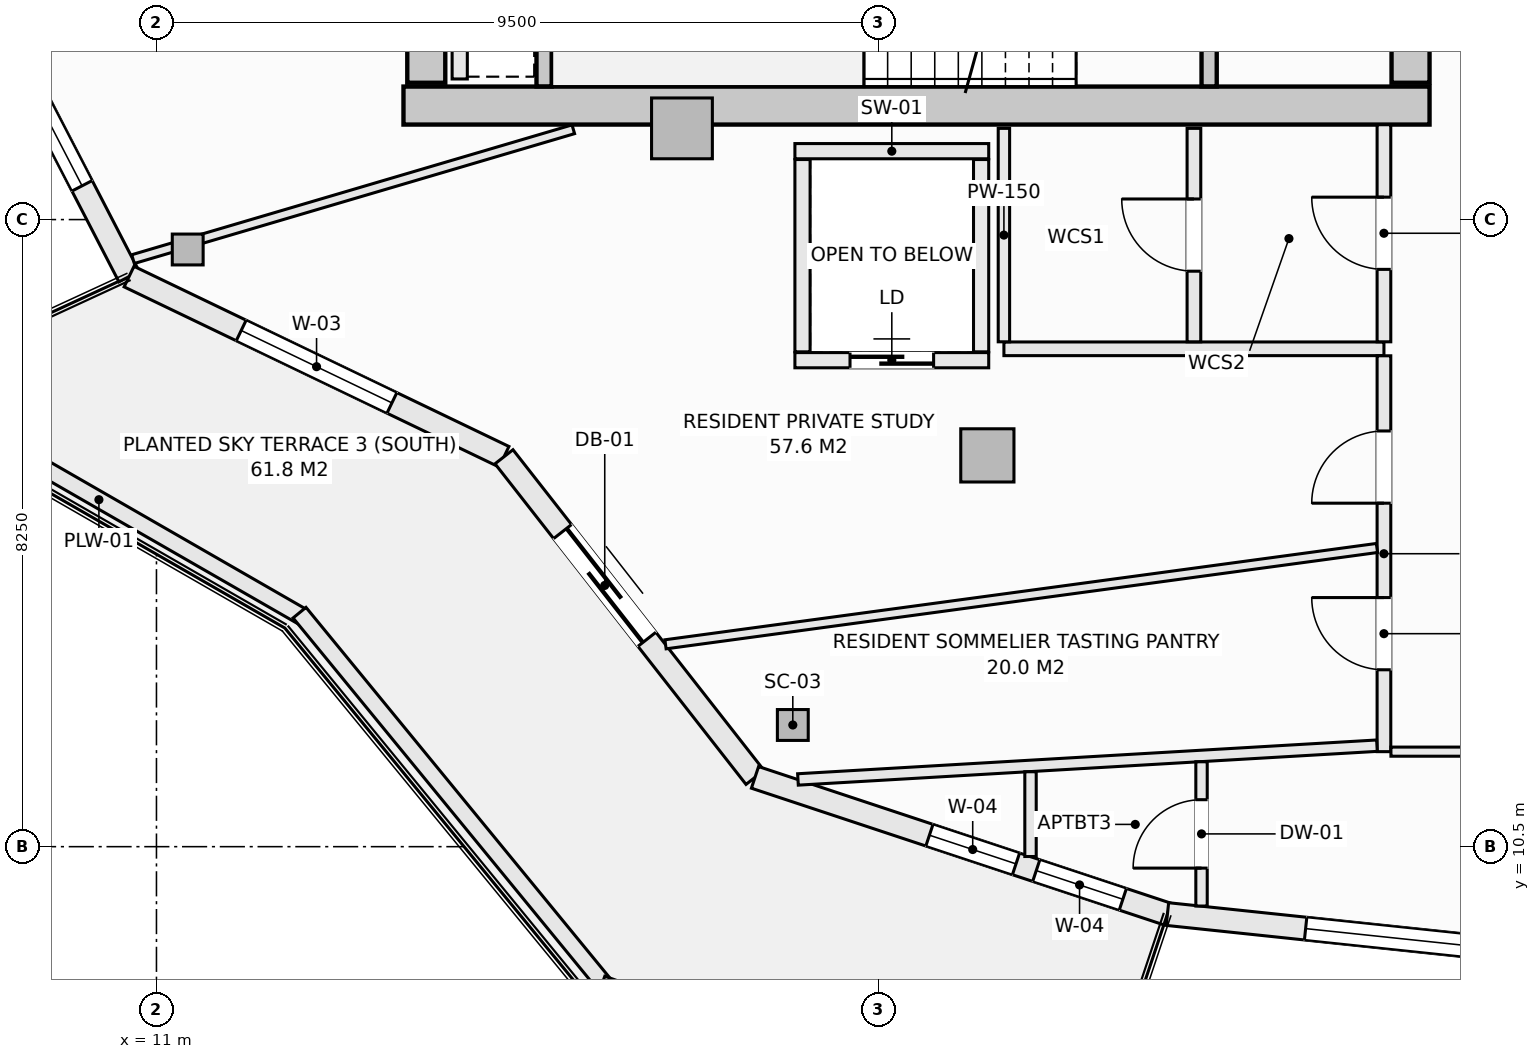
"""IFC4 building model, lengths in metres.
Left out: names, types, materials, properties, quantities, classifications, styles, units other than length and angle.
Written with IfcOpenShell. Run it as: python <this file> out.ifc"""

import sys

from ifc_helpers import new_model, si_unit, direction, frame, frame_2d, origin, origin_2d, place, context, subcontext, project, spatial, rectangle, hollow_rectangle, extrude, element, fill, save


model = new_model("IFC4")
c1 = context("Model", 3, precision=1e-05, world=origin(), true_north=direction((0.0, 1.0)))
c2 = subcontext(c1, "Body", "Model", "MODEL_VIEW")
j1 = project(units=[si_unit("LENGTHUNIT", "METRE"), si_unit("PLANEANGLEUNIT", "RADIAN")], contexts=[c1])
p1 = place(None, origin())
s1 = spatial("IfcSite", under=j1, at=p1, CompositionType="ELEMENT")
p2 = place(p1, origin())
s2 = spatial("IfcBuilding", under=s1, at=p2, CompositionType="ELEMENT")
p3 = place(p2, frame((0.0, 0.0, 242.6)))
s3 = spatial("IfcBuildingStorey", under=s2, at=p3, CompositionType="ELEMENT", Elevation=242.6)
p4 = place(p3, frame((14.25, 20.25, -0.27), z_axis=(0.0, 0.0, 1.0), x_axis=(1.0, 0.0, 0.0)))
e1 = element("IfcWall", 1, at=p4, inside=s3, PredefinedType="SHEAR", context=c2, shape_type="SweptSolid", body=[
    extrude(rectangle(XDim=13.5, YDim=0.5, at=frame_2d((6.75, 0.0))), origin(), (0.0, 0.0, 1.0), 3.3),
])
p5 = place(p3, frame((14.55, 20.55, -0.27), z_axis=(0.0, 0.0, 1.0), x_axis=(0.0, 1.0, 0.0)))
e2 = element("IfcWall", 2, at=p5, inside=s3, PredefinedType="SHEAR", context=c2, shape_type="SweptSolid", body=[
    extrude(rectangle(XDim=12.9, YDim=0.5, at=frame_2d((6.45, 0.0))), origin(), (0.0, 0.0, 1.0), 3.3),
])
p6 = place(p3, frame((27.5, 20.55, -0.27), z_axis=(0.0, 0.0, 1.0), x_axis=(0.0, 1.0, 0.0)))
e3 = element("IfcWall", 3, at=p6, inside=s3, PredefinedType="SHEAR", context=c2, shape_type="SweptSolid", body=[
    extrude(rectangle(XDim=1.5, YDim=0.5, at=frame_2d((0.75, 0.0))), origin(), (0.0, 0.0, 1.0), 3.3),
])
for number, where, z_axis, x_axis in (
    (4, (11.411, 18.356, -0.27), (0.0, 0.0, 1.0), (1.0, 0.0, 0.0)),
    (5, (19.372, 12.101, -0.27), (0.0, 0.0, 1.0), (1.0, 0.0, 0.0)),
):
    element("IfcColumn", number, at=place(p3, frame(where, z_axis=z_axis, x_axis=x_axis)), inside=s3, PredefinedType="COLUMN", context=c2, shape_type="SweptSolid", body=[
        extrude(hollow_rectangle(XDim=0.406, YDim=0.406, WallThickness=0.016, at=origin_2d()), origin(), (0.0, 0.0, 1.0), 3.3),
    ])
p7 = place(p3, frame((21.932, 15.648, -0.27), z_axis=(0.0, 0.0, 1.0), x_axis=(1.0, 0.0, 0.0)))
e6 = element("IfcColumn", 6, at=p7, inside=s3, PredefinedType="COLUMN", context=c2, shape_type="SweptSolid", body=[
    extrude(rectangle(XDim=0.7, YDim=0.7, at=origin_2d()), origin(), (0.0, 0.0, 1.0), 3.3),
])
p8 = place(p3, frame((17.914, 19.95, -0.27), z_axis=(0.0, 0.0, 1.0), x_axis=(1.0, 0.0, 0.0)))
e7 = element("IfcColumn", 7, at=p8, inside=s3, PredefinedType="PILASTER", context=c2, shape_type="SweptSolid", body=[
    extrude(rectangle(XDim=0.8, YDim=0.8, at=origin_2d()), origin(), (0.0, 0.0, 1.0), 3.3),
])
p9 = place(p3, frame((8.392, 22.341, 0.0), z_axis=(0.0, 0.0, 1.0), x_axis=(0.459793771602, -0.888025724625, 0.0)))
e8 = element("IfcWall", 8, at=p9, inside=s3, PredefinedType="SOLIDWALL", context=c2, shape_type="SweptSolid", body=[
    extrude(rectangle(XDim=4.889, YDim=0.3, at=frame_2d((2.444, 0.0))), origin(), (0.0, 0.0, 1.0), 2.605),
])
p10 = place(p9, frame((1.344, 0.0, 0.72)))
e9 = element("IfcOpeningElement", 9, at=p10, cuts=e8, PredefinedType="OPENING", context=c2, shape_type="SweptSolid", body=[
    extrude(rectangle(XDim=2.2, YDim=1.65, at=frame_2d((1.1, 0.825))), frame((0.0, 0.16, 0.0), z_axis=(0.0, -1.0, 0.0), x_axis=(1.0, 0.0, 0.0)), (0.0, 0.0, 1.0), 0.32),
])
p11 = place(p3, frame((10.639, 18.0, 0.0), z_axis=(0.0, 0.0, 1.0), x_axis=(0.901355238351, -0.433080517106, 0.0)))
e10 = element("IfcWall", 10, at=p11, inside=s3, PredefinedType="SOLIDWALL", context=c2, shape_type="SweptSolid", body=[
    extrude(rectangle(XDim=5.473, YDim=0.3, at=frame_2d((2.737, 0.0))), origin(), (0.0, 0.0, 1.0), 2.605),
])
p12 = place(p11, frame((1.637, 0.0, 0.72)))
e11 = element("IfcOpeningElement", 11, at=p12, cuts=e10, PredefinedType="OPENING", context=c2, shape_type="SweptSolid", body=[
    extrude(rectangle(XDim=2.2, YDim=1.65, at=frame_2d((1.1, 0.825))), frame((0.0, 0.16, 0.0), z_axis=(0.0, -1.0, 0.0), x_axis=(1.0, 0.0, 0.0)), (0.0, 0.0, 1.0), 0.32),
])
p13 = place(p3, frame((15.573, 15.63, 0.0), z_axis=(0.0, 0.0, 1.0), x_axis=(0.61644588519, -0.787397276241, 0.0)))
e12 = element("IfcWall", 12, at=p13, inside=s3, PredefinedType="SOLIDWALL", context=c2, shape_type="SweptSolid", body=[
    extrude(rectangle(XDim=5.357, YDim=0.3, at=frame_2d((2.678, 0.0))), origin(), (0.0, 0.0, 1.0), 2.605),
])
p14 = place(p13, frame((1.25, 0.0, 0.0)))
e13 = element("IfcOpeningElement", 13, at=p14, cuts=e12, PredefinedType="OPENING", context=c2, shape_type="SweptSolid", body=[
    extrude(rectangle(XDim=1.8, YDim=2.25, at=frame_2d((0.9, 1.125))), frame((0.0, 0.16, 0.0), z_axis=(0.0, -1.0, 0.0), x_axis=(1.0, 0.0, 0.0)), (0.0, 0.0, 1.0), 0.32),
])
p15 = place(p3, frame((18.875, 11.412, 0.0), z_axis=(0.0, 0.0, 1.0), x_axis=(0.949232769585, -0.314574552605, 0.0)))
e14 = element("IfcWall", 14, at=p15, inside=s3, PredefinedType="SOLIDWALL", context=c2, shape_type="SweptSolid", body=[
    extrude(rectangle(XDim=5.717, YDim=0.3, at=frame_2d((2.858, 0.0))), origin(), (0.0, 0.0, 1.0), 2.605),
])
p16 = place(p15, frame((2.417, 0.0, 0.72)))
e15 = element("IfcOpeningElement", 15, at=p16, cuts=e14, PredefinedType="OPENING", context=c2, shape_type="SweptSolid", body=[
    extrude(rectangle(XDim=1.2, YDim=1.65, at=frame_2d((0.6, 0.825))), frame((0.0, 0.16, 0.0), z_axis=(0.0, -1.0, 0.0), x_axis=(1.0, 0.0, 0.0)), (0.0, 0.0, 1.0), 0.32),
])
p17 = place(p15, frame((3.898, 0.0, 0.72)))
e16 = element("IfcOpeningElement", 16, at=p17, cuts=e14, PredefinedType="OPENING", context=c2, shape_type="SweptSolid", body=[
    extrude(rectangle(XDim=1.2, YDim=1.65, at=frame_2d((0.6, 0.825))), frame((0.0, 0.16, 0.0), z_axis=(0.0, -1.0, 0.0), x_axis=(1.0, 0.0, 0.0)), (0.0, 0.0, 1.0), 0.32),
])
p18 = place(p3, frame((24.302, 9.613, 0.0), z_axis=(0.0, 0.0, 1.0), x_axis=(0.994500425783, -0.10473253132, 0.0)))
e17 = element("IfcWall", 17, at=p18, inside=s3, PredefinedType="SOLIDWALL", context=c2, shape_type="SweptSolid", body=[
    extrude(rectangle(XDim=5.856, YDim=0.3, at=frame_2d((2.928, 0.0))), origin(), (0.0, 0.0, 1.0), 2.605),
])
p19 = place(p18, frame((1.828, 0.0, 0.72)))
e18 = element("IfcOpeningElement", 18, at=p19, cuts=e17, PredefinedType="OPENING", context=c2, shape_type="SweptSolid", body=[
    extrude(rectangle(XDim=2.2, YDim=1.65, at=frame_2d((1.1, 0.825))), frame((0.0, 0.16, 0.0), z_axis=(0.0, -1.0, 0.0), x_axis=(1.0, 0.0, 0.0)), (0.0, 0.0, 1.0), 0.32),
])
p20 = place(p3, frame((7.557, 16.609, 0.0), z_axis=(0.0, 0.0, 1.0), x_axis=(0.866901621005, -0.49847926687, 0.0)))
e19 = element("IfcWall", 19, at=p20, inside=s3, PredefinedType="PARAPET", context=c2, shape_type="SweptSolid", body=[
    extrude(rectangle(XDim=6.197, YDim=0.22, at=frame_2d((3.098, 0.0))), origin(), (0.0, 0.0, 1.0), 0.52),
])
p21 = place(p3, frame((12.882, 13.579, 0.0), z_axis=(0.0, 0.0, 1.0), x_axis=(0.63407318032, -0.77327304492, 0.0)))
e20 = element("IfcWall", 20, at=p21, inside=s3, PredefinedType="PARAPET", context=c2, shape_type="SweptSolid", body=[
    extrude(rectangle(XDim=6.379, YDim=0.22, at=frame_2d((3.189, 0.0))), origin(), (0.0, 0.0, 1.0), 0.52),
])
p22 = place(p3, frame((16.862, 8.692, 0.0), z_axis=(0.0, 0.0, 1.0), x_axis=(0.941139090914, -0.338019543152, 0.0)))
e21 = element("IfcWall", 21, at=p22, inside=s3, PredefinedType="PARAPET", context=c2, shape_type="SweptSolid", body=[
    extrude(rectangle(XDim=6.807, YDim=0.22, at=frame_2d((3.403, 0.0))), origin(), (0.0, 0.0, 1.0), 0.52),
])
p23 = place(p3, frame((24.85, 20.502, -0.27), z_axis=(0.0, 0.0, 1.0), x_axis=(0.0, 1.0, 0.0)))
e22 = element("IfcWall", 22, at=p23, inside=s3, PredefinedType="SHEAR", context=c2, shape_type="SweptSolid", body=[
    extrude(rectangle(XDim=3.038, YDim=0.2, at=frame_2d((1.519, 0.0))), origin(), (0.0, 0.0, 1.0), 3.3),
])
p24 = place(p23, frame((0.969, 0.0, 0.27)))
e23 = element("IfcOpeningElement", 23, at=p24, cuts=e22, PredefinedType="OPENING", context=c2, shape_type="SweptSolid", body=[
    extrude(rectangle(XDim=1.1, YDim=2.15, at=frame_2d((0.55, 1.075))), frame((0.0, 0.11, 0.0), z_axis=(0.0, -1.0, 0.0), x_axis=(1.0, 0.0, 0.0)), (0.0, 0.0, 1.0), 0.22),
])
p25 = place(p3, frame((16.1, 20.502, -0.27), z_axis=(0.0, 0.0, 1.0), x_axis=(0.0, 1.0, 0.0)))
e24 = element("IfcWall", 24, at=p25, inside=s3, PredefinedType="SHEAR", context=c2, shape_type="SweptSolid", body=[
    extrude(rectangle(XDim=3.036, YDim=0.2, at=frame_2d((1.518, 0.0))), origin(), (0.0, 0.0, 1.0), 3.3),
])
p26 = place(p3, frame((19.4, 19.65, 0.0), z_axis=(0.0, 0.0, 1.0), x_axis=(1.0, 0.0, 0.0)))
e25 = element("IfcWall", 25, at=p26, inside=s3, PredefinedType="SOLIDWALL", context=c2, shape_type="SweptSolid", body=[
    extrude(rectangle(XDim=2.55, YDim=0.2, at=frame_2d((1.275, 0.0))), origin(), (0.0, 0.0, 1.0), 3.03),
])
p27 = place(p3, frame((19.4, 16.9, 0.0), z_axis=(0.0, 0.0, 1.0), x_axis=(1.0, 0.0, 0.0)))
e26 = element("IfcWall", 26, at=p27, inside=s3, PredefinedType="SOLIDWALL", context=c2, shape_type="SweptSolid", body=[
    extrude(rectangle(XDim=2.55, YDim=0.2, at=frame_2d((1.275, 0.0))), origin(), (0.0, 0.0, 1.0), 3.03),
])
p28 = place(p27, frame((0.725, 0.0, 0.0)))
e27 = element("IfcOpeningElement", 27, at=p28, cuts=e26, PredefinedType="OPENING", context=c2, shape_type="SweptSolid", body=[
    extrude(rectangle(XDim=1.1, YDim=2.2, at=frame_2d((0.55, 1.1))), frame((0.0, 0.11, 0.0), z_axis=(0.0, -1.0, 0.0), x_axis=(1.0, 0.0, 0.0)), (0.0, 0.0, 1.0), 0.22),
])
for number, where, z_axis, x_axis in (
    (28, (19.5, 17.01, 0.0), (0.0, 0.0, 1.0), (0.0, 1.0, 0.0)),
    (29, (21.85, 17.01, 0.0), (0.0, 0.0, 1.0), (0.0, 1.0, 0.0)),
):
    element("IfcWall", number, at=place(p3, frame(where, z_axis=z_axis, x_axis=x_axis)), inside=s3, PredefinedType="SOLIDWALL", context=c2, shape_type="SweptSolid", body=[
        extrude(rectangle(XDim=2.53, YDim=0.2, at=frame_2d((1.265, 0.0))), origin(), (0.0, 0.0, 1.0), 3.03),
    ])
p29 = place(p3, frame((14.99, 20.6, 0.0), z_axis=(0.0, 0.0, 1.0), x_axis=(0.0, 1.0, 0.0)))
e30 = element("IfcWall", 30, at=p29, inside=s3, PredefinedType="SOLIDWALL", context=c2, shape_type="SweptSolid", body=[
    extrude(rectangle(XDim=2.85, YDim=0.2, at=frame_2d((1.425, 0.0))), origin(), (0.0, 0.0, 1.0), 3.03),
])
p30 = place(p3, frame((22.15, 17.05, 0.0), z_axis=(0.0, 0.0, 1.0), x_axis=(1.0, 0.0, 0.0)))
e31 = element("IfcWall", 31, at=p30, inside=s3, PredefinedType="SOLIDWALL", context=c2, shape_type="SweptSolid", body=[
    extrude(rectangle(XDim=5.0, YDim=0.18, at=frame_2d((2.5, 0.0))), origin(), (0.0, 0.0, 1.0), 3.03),
])
p31 = place(p3, frame((22.15, 17.142, 0.0), z_axis=(0.0, 0.0, 1.0), x_axis=(0.0, 1.0, 0.0)))
e32 = element("IfcWall", 32, at=p31, inside=s3, PredefinedType="PARTITIONING", context=c2, shape_type="SweptSolid", body=[
    extrude(rectangle(XDim=2.808, YDim=0.15, at=frame_2d((1.404, 0.0))), origin(), (0.0, 0.0, 1.0), 3.03),
])
p32 = place(p3, frame((24.65, 17.142, 0.0), z_axis=(0.0, 0.0, 1.0), x_axis=(0.0, 1.0, 0.0)))
e33 = element("IfcWall", 33, at=p32, inside=s3, PredefinedType="SOLIDWALL", context=c2, shape_type="SweptSolid", body=[
    extrude(rectangle(XDim=2.808, YDim=0.18, at=frame_2d((1.404, 0.0))), origin(), (0.0, 0.0, 1.0), 3.03),
])
p33 = place(p32, frame((0.929, 0.0, 0.0)))
e34 = element("IfcOpeningElement", 34, at=p33, cuts=e33, PredefinedType="OPENING", context=c2, shape_type="SweptSolid", body=[
    extrude(rectangle(XDim=0.95, YDim=2.1, at=frame_2d((0.475, 1.05))), frame((0.0, 0.1, 0.0), z_axis=(0.0, -1.0, 0.0), x_axis=(1.0, 0.0, 0.0)), (0.0, 0.0, 1.0), 0.2),
])
p34 = place(p3, frame((27.15, 11.75, 0.0), z_axis=(0.0, 0.0, 1.0), x_axis=(0.0, 1.0, 0.0)))
e35 = element("IfcWall", 35, at=p34, inside=s3, PredefinedType="SOLIDWALL", context=c2, shape_type="SweptSolid", body=[
    extrude(rectangle(XDim=5.208, YDim=0.18, at=frame_2d((2.604, 0.0))), origin(), (0.0, 0.0, 1.0), 3.03),
])
p35 = place(p34, frame((3.269, 0.0, 0.0)))
e36 = element("IfcOpeningElement", 36, at=p35, cuts=e35, PredefinedType="OPENING", context=c2, shape_type="SweptSolid", body=[
    extrude(rectangle(XDim=0.95, YDim=2.1, at=frame_2d((0.475, 1.05))), frame((0.0, 0.1, 0.0), z_axis=(0.0, -1.0, 0.0), x_axis=(1.0, 0.0, 0.0)), (0.0, 0.0, 1.0), 0.2),
])
p36 = place(p34, frame((1.077, 0.0, 0.0)))
e37 = element("IfcOpeningElement", 37, at=p36, cuts=e35, PredefinedType="OPENING", context=c2, shape_type="SweptSolid", body=[
    extrude(rectangle(XDim=0.95, YDim=2.1, at=frame_2d((0.475, 1.05))), frame((0.0, 0.1, 0.0), z_axis=(0.0, -1.0, 0.0), x_axis=(1.0, 0.0, 0.0)), (0.0, 0.0, 1.0), 0.2),
])
p37 = place(p3, frame((27.15, 17.142, 0.0), z_axis=(0.0, 0.0, 1.0), x_axis=(0.0, 1.0, 0.0)))
e38 = element("IfcWall", 38, at=p37, inside=s3, PredefinedType="SOLIDWALL", context=c2, shape_type="SweptSolid", body=[
    extrude(rectangle(XDim=2.856, YDim=0.18, at=frame_2d((1.428, 0.0))), origin(), (0.0, 0.0, 1.0), 3.03),
])
p38 = place(p37, frame((0.953, 0.0, 0.0)))
e39 = element("IfcOpeningElement", 39, at=p38, cuts=e38, PredefinedType="OPENING", context=c2, shape_type="SweptSolid", body=[
    extrude(rectangle(XDim=0.95, YDim=2.1, at=frame_2d((0.475, 1.05))), frame((0.0, 0.1, 0.0), z_axis=(0.0, -1.0, 0.0), x_axis=(1.0, 0.0, 0.0)), (0.0, 0.0, 1.0), 0.2),
])
p39 = place(p3, frame((27.242, 11.75, 0.0), z_axis=(0.0, 0.0, 1.0), x_axis=(1.0, 0.0, 0.0)))
e40 = element("IfcWall", 40, at=p39, inside=s3, PredefinedType="PARTITIONING", context=c2, shape_type="SweptSolid", body=[
    extrude(rectangle(XDim=7.226, YDim=0.12, at=frame_2d((3.613, 0.0))), origin(), (0.0, 0.0, 1.0), 3.03),
])
p40 = place(p39, frame((3.138, 0.0, 0.0)))
e41 = element("IfcOpeningElement", 41, at=p40, cuts=e40, PredefinedType="OPENING", context=c2, shape_type="SweptSolid", body=[
    extrude(rectangle(XDim=0.95, YDim=2.1, at=frame_2d((0.475, 1.05))), frame((0.0, 0.07, 0.0), z_axis=(0.0, -1.0, 0.0), x_axis=(1.0, 0.0, 0.0)), (0.0, 0.0, 1.0), 0.14),
])
p41 = place(p3, frame((10.692, 18.23, 0.0), z_axis=(0.0, 0.0, 1.0), x_axis=(0.959163130609, 0.282853475992, 0.0)))
e42 = element("IfcWall", 42, at=p41, inside=s3, PredefinedType="PARTITIONING", context=c2, shape_type="SweptSolid", body=[
    extrude(rectangle(XDim=6.039, YDim=0.12, at=frame_2d((3.02, 0.0))), origin(), (0.0, 0.0, 1.0), 2.77),
])
p42 = place(p3, frame((17.698, 13.162, 0.0), z_axis=(0.0, 0.0, 1.0), x_axis=(0.990958840374, 0.134166227808, 0.0)))
e43 = element("IfcWall", 43, at=p42, inside=s3, PredefinedType="PARTITIONING", context=c2, shape_type="SweptSolid", body=[
    extrude(rectangle(XDim=9.446, YDim=0.12, at=frame_2d((4.723, 0.0))), origin(), (0.0, 0.0, 1.0), 3.03),
])
p43 = place(p3, frame((19.44, 11.384, 0.0), z_axis=(0.0, 0.0, 1.0), x_axis=(0.998303266402, 0.058228758288, 0.0)))
e44 = element("IfcWall", 44, at=p43, inside=s3, PredefinedType="PARTITIONING", context=c2, shape_type="SweptSolid", body=[
    extrude(rectangle(XDim=7.631, YDim=0.15, at=frame_2d((3.815, 0.0))), origin(), (0.0, 0.0, 1.0), 2.605),
])
p44 = place(p3, frame((24.75, 9.719, 0.0), z_axis=(0.0, 0.0, 1.0), x_axis=(0.0, 1.0, 0.0)))
e45 = element("IfcWall", 45, at=p44, inside=s3, PredefinedType="PARTITIONING", context=c2, shape_type="SweptSolid", body=[
    extrude(rectangle(XDim=1.898, YDim=0.15, at=frame_2d((0.949, 0.0))), origin(), (0.0, 0.0, 1.0), 2.77),
])
p45 = place(p44, frame((0.499, 0.0, 0.0)))
e46 = element("IfcOpeningElement", 46, at=p45, cuts=e45, PredefinedType="OPENING", context=c2, shape_type="SweptSolid", body=[
    extrude(rectangle(XDim=0.9, YDim=2.1, at=frame_2d((0.45, 1.05))), frame((0.0, 0.085, 0.0), z_axis=(0.0, -1.0, 0.0), x_axis=(1.0, 0.0, 0.0)), (0.0, 0.0, 1.0), 0.17),
])
p46 = place(p3, frame((22.5, 10.37, 0.0), z_axis=(0.0, 0.0, 1.0), x_axis=(0.0, 1.0, 0.0)))
e47 = element("IfcWall", 47, at=p46, inside=s3, PredefinedType="PARTITIONING", context=c2, shape_type="SweptSolid", body=[
    extrude(rectangle(XDim=1.115, YDim=0.15, at=frame_2d((0.558, 0.0))), origin(), (0.0, 0.0, 1.0), 3.03),
])
p47 = place(p10, origin())
e48 = element("IfcWindow", 48, at=p47, inside=s3, PartitioningType="SINGLE_PANEL", PredefinedType="WINDOW", context=c2, shape_type="SweptSolid", body=[
    extrude(rectangle(XDim=2.2, YDim=1.65, at=frame_2d((1.1, 0.825))), frame((0.0, 0.03, 0.0), z_axis=(0.0, -1.0, 0.0), x_axis=(1.0, 0.0, 0.0)), (0.0, 0.0, 1.0), 0.06),
])
fill(e9, e48)
p48 = place(p12, origin())
e49 = element("IfcWindow", 49, at=p48, inside=s3, PartitioningType="SINGLE_PANEL", PredefinedType="WINDOW", context=c2, shape_type="SweptSolid", body=[
    extrude(rectangle(XDim=2.2, YDim=1.65, at=frame_2d((1.1, 0.825))), frame((0.0, 0.03, 0.0), z_axis=(0.0, -1.0, 0.0), x_axis=(1.0, 0.0, 0.0)), (0.0, 0.0, 1.0), 0.06),
])
fill(e11, e49)
p49 = place(p14, frame((1.8, 0.0, 0.0), z_axis=(0.0, 0.0, 1.0), x_axis=(-1.0, 0.0, 0.0)))
e50 = element("IfcDoor", 50, at=p49, inside=s3, OperationType="SLIDING_TO_LEFT", PredefinedType="DOOR", context=c2, shape_type="SweptSolid", body=[
    extrude(rectangle(XDim=1.8, YDim=2.25, at=frame_2d((0.9, 1.125))), frame((0.0, 0.025, 0.0), z_axis=(0.0, -1.0, 0.0), x_axis=(1.0, 0.0, 0.0)), (0.0, 0.0, 1.0), 0.05),
])
fill(e13, e50)
p50 = place(p16, origin())
e51 = element("IfcWindow", 51, at=p50, inside=s3, PartitioningType="SINGLE_PANEL", PredefinedType="WINDOW", context=c2, shape_type="SweptSolid", body=[
    extrude(rectangle(XDim=1.2, YDim=1.65, at=frame_2d((0.6, 0.825))), frame((0.0, 0.03, 0.0), z_axis=(0.0, -1.0, 0.0), x_axis=(1.0, 0.0, 0.0)), (0.0, 0.0, 1.0), 0.06),
])
fill(e15, e51)
p51 = place(p19, origin())
e52 = element("IfcWindow", 52, at=p51, inside=s3, PartitioningType="SINGLE_PANEL", PredefinedType="WINDOW", context=c2, shape_type="SweptSolid", body=[
    extrude(rectangle(XDim=2.2, YDim=1.65, at=frame_2d((1.1, 0.825))), frame((0.0, 0.03, 0.0), z_axis=(0.0, -1.0, 0.0), x_axis=(1.0, 0.0, 0.0)), (0.0, 0.0, 1.0), 0.06),
])
fill(e18, e52)
p52 = place(p28, origin())
e53 = element("IfcDoor", 53, at=p52, inside=s3, OperationType="SLIDING_TO_LEFT", PredefinedType="DOOR", context=c2, shape_type="SweptSolid", body=[
    extrude(rectangle(XDim=1.1, YDim=2.2, at=frame_2d((0.55, 1.1))), frame((0.0, 0.025, 0.0), z_axis=(0.0, -1.0, 0.0), x_axis=(1.0, 0.0, 0.0)), (0.0, 0.0, 1.0), 0.05),
])
fill(e27, e53)
p53 = place(p38, origin())
e54 = element("IfcDoor", 54, at=p53, inside=s3, OperationType="SINGLE_SWING_RIGHT", PredefinedType="DOOR", context=c2, shape_type="SweptSolid", body=[
    extrude(rectangle(XDim=0.95, YDim=2.1, at=frame_2d((0.475, 1.05))), frame((0.0, 0.025, 0.0), z_axis=(0.0, -1.0, 0.0), x_axis=(1.0, 0.0, 0.0)), (0.0, 0.0, 1.0), 0.05),
])
fill(e39, e54)
p54 = place(p35, origin())
e55 = element("IfcDoor", 55, at=p54, inside=s3, OperationType="SINGLE_SWING_LEFT", PredefinedType="DOOR", context=c2, shape_type="SweptSolid", body=[
    extrude(rectangle(XDim=0.95, YDim=2.1, at=frame_2d((0.475, 1.05))), frame((0.0, 0.025, 0.0), z_axis=(0.0, -1.0, 0.0), x_axis=(1.0, 0.0, 0.0)), (0.0, 0.0, 1.0), 0.05),
])
fill(e36, e55)
p55 = place(p36, origin())
e56 = element("IfcDoor", 56, at=p55, inside=s3, OperationType="SINGLE_SWING_RIGHT", PredefinedType="DOOR", context=c2, shape_type="SweptSolid", body=[
    extrude(rectangle(XDim=0.95, YDim=2.1, at=frame_2d((0.475, 1.05))), frame((0.0, 0.025, 0.0), z_axis=(0.0, -1.0, 0.0), x_axis=(1.0, 0.0, 0.0)), (0.0, 0.0, 1.0), 0.05),
])
fill(e37, e56)
p56 = place(p45, origin())
e57 = element("IfcDoor", 57, at=p56, inside=s3, OperationType="SINGLE_SWING_LEFT", PredefinedType="DOOR", context=c2, shape_type="SweptSolid", body=[
    extrude(rectangle(XDim=0.9, YDim=2.1, at=frame_2d((0.45, 1.05))), frame((0.0, 0.025, 0.0), z_axis=(0.0, -1.0, 0.0), x_axis=(1.0, 0.0, 0.0)), (0.0, 0.0, 1.0), 0.05),
])
fill(e46, e57)
p57 = place(p33, origin())
e58 = element("IfcDoor", 58, at=p57, inside=s3, OperationType="SINGLE_SWING_RIGHT", PredefinedType="DOOR", context=c2, shape_type="SweptSolid", body=[
    extrude(rectangle(XDim=0.95, YDim=2.1, at=frame_2d((0.475, 1.05))), frame((0.0, 0.025, 0.0), z_axis=(0.0, -1.0, 0.0), x_axis=(1.0, 0.0, 0.0)), (0.0, 0.0, 1.0), 0.05),
])
fill(e34, e58)
p58 = place(p17, origin())
e59 = element("IfcWindow", 59, at=p58, inside=s3, PartitioningType="SINGLE_PANEL", PredefinedType="WINDOW", context=c2, shape_type="SweptSolid", body=[
    extrude(rectangle(XDim=1.2, YDim=1.65, at=frame_2d((0.6, 0.825))), frame((0.0, 0.03, 0.0), z_axis=(0.0, -1.0, 0.0), x_axis=(1.0, 0.0, 0.0)), (0.0, 0.0, 1.0), 0.06),
])
fill(e16, e59)
save(model, sys.argv[1])
